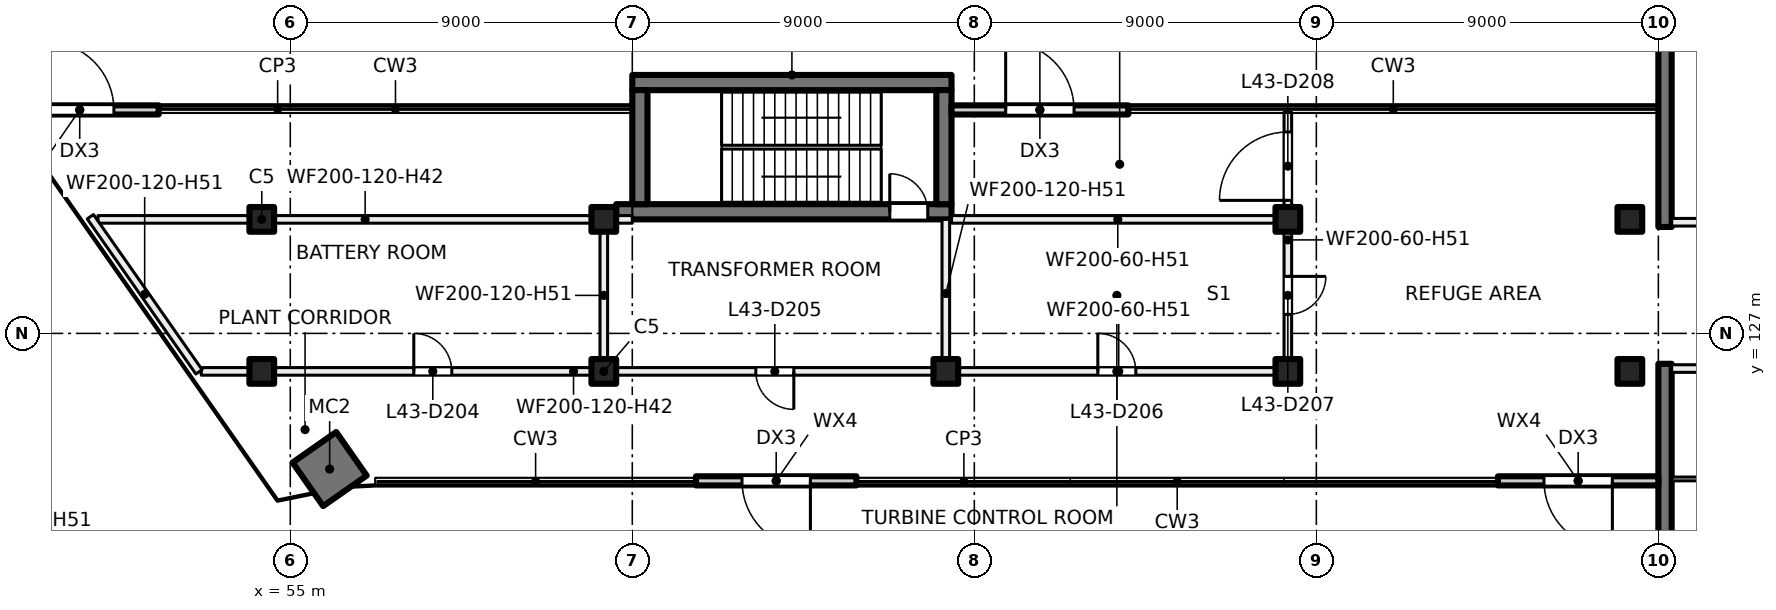
"""IFC4 building model, lengths in metres.
Left out: names, types, materials, properties, quantities, classifications, styles, units other than length and angle.
Written with IfcOpenShell. Run it as: python <this file> out.ifc"""

import sys

from ifc_helpers import new_model, si_unit, direction, frame, frame_2d, origin, origin_2d, place, context, subcontext, project, spatial, rectangle, hollow_rectangle, extrude, element, fill, save


model = new_model("IFC4")
c1 = context("Model", 3, precision=1e-05, world=origin(), true_north=direction((0.0, 1.0)))
c2 = subcontext(c1, "Body", "Model", "MODEL_VIEW")
j1 = project(units=[si_unit("LENGTHUNIT", "METRE"), si_unit("PLANEANGLEUNIT", "RADIAN")], contexts=[c1])
p1 = place(None, origin())
s1 = spatial("IfcSite", under=j1, at=p1, CompositionType="ELEMENT")
p2 = place(p1, origin())
s2 = spatial("IfcBuilding", under=s1, at=p2, CompositionType="ELEMENT")
p3 = place(p2, frame((0.0, 0.0, 182.5)))
s3 = spatial("IfcBuildingStorey", under=s2, at=p3, CompositionType="ELEMENT", Elevation=182.5)
p4 = place(p3, frame((56.036, 123.43, 0.0), z_axis=(0.0, 0.0, 1.0), x_axis=(0.573576436351, -0.819152044289, 0.0)))
e1 = element("IfcColumn", 1, at=p4, inside=s3, PredefinedType="COLUMN", context=c2, shape_type="SweptSolid", body=[
    extrude(hollow_rectangle(XDim=1.4, YDim=1.4, WallThickness=0.032, at=origin_2d()), origin(), (0.0, 0.0, 1.0), 5.5),
])
for number, where, z_axis, x_axis in (
    (2, (54.25, 130.0, 0.0), (0.0, 0.0, 1.0), (1.0, 0.0, 0.0)),
    (3, (63.25, 130.0, 0.0), (0.0, 0.0, 1.0), (1.0, 0.0, 0.0)),
    (4, (81.25, 130.0, 0.0), (0.0, 0.0, 1.0), (1.0, 0.0, 0.0)),
    (5, (90.25, 130.0, 0.0), (0.0, 0.0, 1.0), (1.0, 0.0, 0.0)),
    (6, (54.25, 126.0, 0.0), (0.0, 0.0, 1.0), (1.0, 0.0, 0.0)),
    (7, (63.25, 126.0, 0.0), (0.0, 0.0, 1.0), (1.0, 0.0, 0.0)),
    (8, (72.25, 126.0, 0.0), (0.0, 0.0, 1.0), (1.0, 0.0, 0.0)),
    (9, (81.25, 126.0, 0.0), (0.0, 0.0, 1.0), (1.0, 0.0, 0.0)),
    (10, (90.25, 126.0, 0.0), (0.0, 0.0, 1.0), (1.0, 0.0, 0.0)),
):
    element("IfcColumn", number, at=place(p3, frame(where, z_axis=z_axis, x_axis=x_axis)), inside=s3, PredefinedType="COLUMN", context=c2, shape_type="SweptSolid", body=[
        extrude(rectangle(XDim=0.65, YDim=0.65, at=origin_2d()), origin(), (0.0, 0.0, 1.0), 5.5),
    ])
for number, where, z_axis, x_axis in (
    (11, (91.175, 138.45, 0.0), (0.0, 0.0, 1.0), (0.0, -1.0, 0.0)),
    (12, (91.175, 126.2, 0.0), (0.0, 0.0, 1.0), (0.0, -1.0, 0.0)),
):
    element("IfcWall", number, at=place(p3, frame(where, z_axis=z_axis, x_axis=x_axis)), inside=s3, PredefinedType="SHEAR", context=c2, shape_type="SweptSolid", body=[
        extrude(rectangle(XDim=8.65, YDim=0.35, at=frame_2d((4.325, 0.0))), origin(), (0.0, 0.0, 1.0), 5.5),
    ])
p5 = place(p3, frame((63.575, 130.2, 0.0), z_axis=(0.0, 0.0, 1.0), x_axis=(1.0, 0.0, 0.0)))
e13 = element("IfcWall", 13, at=p5, inside=s3, PredefinedType="SHEAR", context=c2, shape_type="SweptSolid", body=[
    extrude(rectangle(XDim=8.825, YDim=0.4, at=frame_2d((4.413, 0.0))), origin(), (0.0, 0.0, 1.0), 5.5),
])
p6 = place(p5, frame((7.2, 0.0, 0.0)))
e14 = element("IfcOpeningElement", 14, at=p6, cuts=e13, PredefinedType="OPENING", context=c2, shape_type="SweptSolid", body=[
    extrude(rectangle(XDim=1.0, YDim=2.1, at=frame_2d((0.5, 1.05))), frame((0.0, 0.21, 0.0), z_axis=(0.0, -1.0, 0.0), x_axis=(1.0, 0.0, 0.0)), (0.0, 0.0, 1.0), 0.42),
])
p7 = place(p3, frame((64.0, 133.6, 0.0), z_axis=(0.0, 0.0, 1.0), x_axis=(1.0, 0.0, 0.0)))
e15 = element("IfcWall", 15, at=p7, inside=s3, PredefinedType="SHEAR", context=c2, shape_type="SweptSolid", body=[
    extrude(rectangle(XDim=8.4, YDim=0.4, at=frame_2d((4.2, 0.0))), origin(), (0.0, 0.0, 1.0), 5.5),
])
for number, where, z_axis, x_axis in (
    (16, (64.2, 130.4, 0.0), (0.0, 0.0, 1.0), (0.0, 1.0, 0.0)),
    (17, (72.2, 130.4, 0.0), (0.0, 0.0, 1.0), (0.0, 1.0, 0.0)),
):
    element("IfcWall", number, at=place(p3, frame(where, z_axis=z_axis, x_axis=x_axis)), inside=s3, PredefinedType="SHEAR", context=c2, shape_type="SweptSolid", body=[
        extrude(rectangle(XDim=3.0, YDim=0.4, at=frame_2d((1.5, 0.0))), origin(), (0.0, 0.0, 1.0), 5.5),
    ])
p8 = place(p3, frame((47.382, 132.88, 0.0), z_axis=(0.0, 0.0, 1.0), x_axis=(1.0, 0.0, 0.0)))
e18 = element("IfcWall", 18, at=p8, inside=s3, PredefinedType="SOLIDWALL", context=c2, shape_type="SweptSolid", body=[
    extrude(rectangle(XDim=4.155, YDim=0.24, at=frame_2d((2.077, 0.0))), origin(), (0.0, 0.0, 1.0), 5.125),
])
p9 = place(p8, frame((1.177, 0.0, 0.0)))
e19 = element("IfcOpeningElement", 19, at=p9, cuts=e18, PredefinedType="OPENING", context=c2, shape_type="SweptSolid", body=[
    extrude(rectangle(XDim=1.8, YDim=2.4, at=frame_2d((0.9, 1.2))), frame((0.0, 0.13, 0.0), z_axis=(0.0, -1.0, 0.0), x_axis=(1.0, 0.0, 0.0)), (0.0, 0.0, 1.0), 0.26),
])
p10 = place(p3, frame((91.0, 123.12, 0.0), z_axis=(0.0, 0.0, 1.0), x_axis=(-1.0, 0.0, 0.0)))
e20 = element("IfcWall", 20, at=p10, inside=s3, PredefinedType="SOLIDWALL", context=c2, shape_type="SweptSolid", body=[
    extrude(rectangle(XDim=4.221, YDim=0.24, at=frame_2d((2.11, 0.0))), origin(), (0.0, 0.0, 1.0), 5.125),
])
p11 = place(p10, frame((1.21, 0.0, 0.0)))
e21 = element("IfcOpeningElement", 21, at=p11, cuts=e20, PredefinedType="OPENING", context=c2, shape_type="SweptSolid", body=[
    extrude(rectangle(XDim=1.8, YDim=2.4, at=frame_2d((0.9, 1.2))), frame((0.0, 0.13, 0.0), z_axis=(0.0, -1.0, 0.0), x_axis=(1.0, 0.0, 0.0)), (0.0, 0.0, 1.0), 0.26),
])
p12 = place(p3, frame((69.897, 123.12, 0.0), z_axis=(0.0, 0.0, 1.0), x_axis=(-1.0, 0.0, 0.0)))
e22 = element("IfcWall", 22, at=p12, inside=s3, PredefinedType="SOLIDWALL", context=c2, shape_type="SweptSolid", body=[
    extrude(rectangle(XDim=4.221, YDim=0.24, at=frame_2d((2.11, 0.0))), origin(), (0.0, 0.0, 1.0), 5.125),
])
p13 = place(p12, frame((1.21, 0.0, 0.0)))
e23 = element("IfcOpeningElement", 23, at=p13, cuts=e22, PredefinedType="OPENING", context=c2, shape_type="SweptSolid", body=[
    extrude(rectangle(XDim=1.8, YDim=2.4, at=frame_2d((0.9, 1.2))), frame((0.0, 0.13, 0.0), z_axis=(0.0, -1.0, 0.0), x_axis=(1.0, 0.0, 0.0)), (0.0, 0.0, 1.0), 0.26),
])
p14 = place(p3, frame((72.4, 132.88, 0.0), z_axis=(0.0, 0.0, 1.0), x_axis=(1.0, 0.0, 0.0)))
e24 = element("IfcWall", 24, at=p14, inside=s3, PredefinedType="SOLIDWALL", context=c2, shape_type="SweptSolid", body=[
    extrude(rectangle(XDim=4.65, YDim=0.24, at=frame_2d((2.325, 0.0))), origin(), (0.0, 0.0, 1.0), 5.125),
])
p15 = place(p14, frame((1.425, 0.0, 0.0)))
e25 = element("IfcOpeningElement", 25, at=p15, cuts=e24, PredefinedType="OPENING", context=c2, shape_type="SweptSolid", body=[
    extrude(rectangle(XDim=1.8, YDim=2.4, at=frame_2d((0.9, 1.2))), frame((0.0, 0.13, 0.0), z_axis=(0.0, -1.0, 0.0), x_axis=(1.0, 0.0, 0.0)), (0.0, 0.0, 1.0), 0.26),
])
p16 = place(p3, frame((95.225, 126.075, 0.0), z_axis=(0.0, 0.0, 1.0), x_axis=(-1.0, 0.0, 0.0)))
e26 = element("IfcWall", 26, at=p16, inside=s3, PredefinedType="PARTITIONING", context=c2, shape_type="SweptSolid", body=[
    extrude(rectangle(XDim=3.875, YDim=0.2, at=frame_2d((1.938, 0.0))), origin(), (0.0, 0.0, 1.0), 5.125),
])
p17 = place(p16, frame((0.3, 0.0, 0.0)))
e27 = element("IfcOpeningElement", 27, at=p17, cuts=e26, PredefinedType="OPENING", context=c2, shape_type="SweptSolid", body=[
    extrude(rectangle(XDim=1.2, YDim=2.1, at=frame_2d((0.6, 1.05))), frame((0.0, 0.11, 0.0), z_axis=(0.0, -1.0, 0.0), x_axis=(1.0, 0.0, 0.0)), (0.0, 0.0, 1.0), 0.22),
])
p18 = place(p3, frame((93.375, 123.17, 0.0), z_axis=(0.0, 0.0, 1.0), x_axis=(-1.0, 0.0, 0.0)))
e28 = element("IfcWall", 28, at=p18, inside=s3, PredefinedType="PARTITIONING", context=c2, shape_type="SweptSolid", body=[
    extrude(rectangle(XDim=2.025, YDim=0.1, at=frame_2d((1.012, 0.0))), origin(), (0.0, 0.0, 1.0), 5.125),
])
p19 = place(p3, frame((91.35, 129.925, 0.0), z_axis=(0.0, 0.0, 1.0), x_axis=(1.0, 0.0, 0.0)))
e29 = element("IfcWall", 29, at=p19, inside=s3, PredefinedType="PARTITIONING", context=c2, shape_type="SweptSolid", body=[
    extrude(rectangle(XDim=3.875, YDim=0.2, at=frame_2d((1.938, 0.0))), origin(), (0.0, 0.0, 1.0), 5.125),
])
p20 = place(p19, frame((2.375, 0.0, 0.0)))
e30 = element("IfcOpeningElement", 30, at=p20, cuts=e29, PredefinedType="OPENING", context=c2, shape_type="SweptSolid", body=[
    extrude(rectangle(XDim=1.2, YDim=2.1, at=frame_2d((0.6, 1.05))), frame((0.0, 0.11, 0.0), z_axis=(0.0, -1.0, 0.0), x_axis=(1.0, 0.0, 0.0)), (0.0, 0.0, 1.0), 0.22),
])
p21 = place(p3, frame((49.941, 130.0, 0.0), z_axis=(0.0, 0.0, 1.0), x_axis=(1.0, 0.0, 0.0)))
e31 = element("IfcWall", 31, at=p21, inside=s3, PredefinedType="PARTITIONING", context=c2, shape_type="SweptSolid", body=[
    extrude(rectangle(XDim=14.059, YDim=0.2, at=frame_2d((7.03, 0.0))), origin(), (0.0, 0.0, 1.0), 4.225),
])
p22 = place(p3, frame((52.657, 126.0, 0.0), z_axis=(0.0, 0.0, 1.0), x_axis=(1.0, 0.0, 0.0)))
e32 = element("IfcWall", 32, at=p22, inside=s3, PredefinedType="PARTITIONING", context=c2, shape_type="SweptSolid", body=[
    extrude(rectangle(XDim=19.593, YDim=0.2, at=frame_2d((9.796, 0.0))), origin(), (0.0, 0.0, 1.0), 4.225),
])
p23 = place(p22, frame((5.593, 0.0, 0.0)))
e33 = element("IfcOpeningElement", 33, at=p23, cuts=e32, PredefinedType="OPENING", context=c2, shape_type="SweptSolid", body=[
    extrude(rectangle(XDim=1.0, YDim=2.1, at=frame_2d((0.5, 1.05))), frame((0.0, 0.11, 0.0), z_axis=(0.0, -1.0, 0.0), x_axis=(1.0, 0.0, 0.0)), (0.0, 0.0, 1.0), 0.22),
])
p24 = place(p22, frame((14.593, 0.0, 0.0)))
e34 = element("IfcOpeningElement", 34, at=p24, cuts=e32, PredefinedType="OPENING", context=c2, shape_type="SweptSolid", body=[
    extrude(rectangle(XDim=1.0, YDim=2.1, at=frame_2d((0.5, 1.05))), frame((0.0, 0.11, 0.0), z_axis=(0.0, -1.0, 0.0), x_axis=(1.0, 0.0, 0.0)), (0.0, 0.0, 1.0), 0.22),
])
p25 = place(p3, frame((63.25, 126.1, 0.0), z_axis=(0.0, 0.0, 1.0), x_axis=(0.0, 1.0, 0.0)))
e35 = element("IfcWall", 35, at=p25, inside=s3, PredefinedType="PARTITIONING", context=c2, shape_type="SweptSolid", body=[
    extrude(rectangle(XDim=3.8, YDim=0.2, at=frame_2d((1.9, 0.0))), origin(), (0.0, 0.0, 1.0), 5.125),
])
p26 = place(p3, frame((72.25, 126.1, 0.0), z_axis=(0.0, 0.0, 1.0), x_axis=(0.0, 1.0, 0.0)))
e36 = element("IfcWall", 36, at=p26, inside=s3, PredefinedType="PARTITIONING", context=c2, shape_type="SweptSolid", body=[
    extrude(rectangle(XDim=3.9, YDim=0.2, at=frame_2d((1.95, 0.0))), origin(), (0.0, 0.0, 1.0), 5.125),
])
p27 = place(p3, frame((72.25, 126.0, 0.0), z_axis=(0.0, 0.0, 1.0), x_axis=(1.0, 0.0, 0.0)))
e37 = element("IfcWall", 37, at=p27, inside=s3, PredefinedType="PARTITIONING", context=c2, shape_type="SweptSolid", body=[
    extrude(rectangle(XDim=9.1, YDim=0.2, at=frame_2d((4.55, 0.0))), origin(), (0.0, 0.0, 1.0), 5.125),
])
p28 = place(p27, frame((4.0, 0.0, 0.0)))
e38 = element("IfcOpeningElement", 38, at=p28, cuts=e37, PredefinedType="OPENING", context=c2, shape_type="SweptSolid", body=[
    extrude(rectangle(XDim=1.0, YDim=2.1, at=frame_2d((0.5, 1.05))), frame((0.0, 0.11, 0.0), z_axis=(0.0, -1.0, 0.0), x_axis=(1.0, 0.0, 0.0)), (0.0, 0.0, 1.0), 0.22),
])
p29 = place(p3, frame((72.4, 130.0, 0.0), z_axis=(0.0, 0.0, 1.0), x_axis=(1.0, 0.0, 0.0)))
e39 = element("IfcWall", 39, at=p29, inside=s3, PredefinedType="PARTITIONING", context=c2, shape_type="SweptSolid", body=[
    extrude(rectangle(XDim=8.75, YDim=0.2, at=frame_2d((4.375, 0.0))), origin(), (0.0, 0.0, 1.0), 5.125),
])
p30 = place(p3, frame((81.25, 126.1, 0.0), z_axis=(0.0, 0.0, 1.0), x_axis=(0.0, 1.0, 0.0)))
e40 = element("IfcWall", 40, at=p30, inside=s3, PredefinedType="PARTITIONING", context=c2, shape_type="SweptSolid", body=[
    extrude(rectangle(XDim=6.72, YDim=0.2, at=frame_2d((3.36, 0.0))), origin(), (0.0, 0.0, 1.0), 5.125),
])
p31 = place(p30, frame((1.4, 0.0, 0.0)))
e41 = element("IfcOpeningElement", 41, at=p31, cuts=e40, PredefinedType="OPENING", context=c2, shape_type="SweptSolid", body=[
    extrude(rectangle(XDim=1.0, YDim=2.1, at=frame_2d((0.5, 1.05))), frame((0.0, 0.11, 0.0), z_axis=(0.0, -1.0, 0.0), x_axis=(1.0, 0.0, 0.0)), (0.0, 0.0, 1.0), 0.22),
])
p32 = place(p30, frame((4.4, 0.0, 0.0)))
e42 = element("IfcOpeningElement", 42, at=p32, cuts=e40, PredefinedType="OPENING", context=c2, shape_type="SweptSolid", body=[
    extrude(rectangle(XDim=1.8, YDim=2.1, at=frame_2d((0.9, 1.05))), frame((0.0, 0.11, 0.0), z_axis=(0.0, -1.0, 0.0), x_axis=(1.0, 0.0, 0.0)), (0.0, 0.0, 1.0), 0.22),
])
p33 = place(p3, frame((52.598, 125.988, 0.0), z_axis=(0.0, 0.0, 1.0), x_axis=(-0.573659598331, 0.819093807352, 0.0)))
e43 = element("IfcWall", 43, at=p33, inside=s3, PredefinedType="PARTITIONING", context=c2, shape_type="SweptSolid", body=[
    extrude(rectangle(XDim=4.984, YDim=0.2, at=frame_2d((2.492, 0.0))), origin(), (0.0, 0.0, 1.0), 5.125),
])
p34 = place(p9, origin())
e44 = element("IfcDoor", 44, at=p34, inside=s3, OperationType="DOUBLE_DOOR_SINGLE_SWING", PredefinedType="DOOR", context=c2, shape_type="SweptSolid", body=[
    extrude(rectangle(XDim=1.8, YDim=2.4, at=frame_2d((0.9, 1.2))), frame((0.0, 0.025, 0.0), z_axis=(0.0, -1.0, 0.0), x_axis=(1.0, 0.0, 0.0)), (0.0, 0.0, 1.0), 0.05),
])
fill(e19, e44)
p35 = place(p11, origin())
e45 = element("IfcDoor", 45, at=p35, inside=s3, OperationType="DOUBLE_DOOR_SINGLE_SWING", PredefinedType="DOOR", context=c2, shape_type="SweptSolid", body=[
    extrude(rectangle(XDim=1.8, YDim=2.4, at=frame_2d((0.9, 1.2))), frame((0.0, 0.025, 0.0), z_axis=(0.0, -1.0, 0.0), x_axis=(1.0, 0.0, 0.0)), (0.0, 0.0, 1.0), 0.05),
])
fill(e21, e45)
p36 = place(p13, origin())
e46 = element("IfcDoor", 46, at=p36, inside=s3, OperationType="DOUBLE_DOOR_SINGLE_SWING", PredefinedType="DOOR", context=c2, shape_type="SweptSolid", body=[
    extrude(rectangle(XDim=1.8, YDim=2.4, at=frame_2d((0.9, 1.2))), frame((0.0, 0.025, 0.0), z_axis=(0.0, -1.0, 0.0), x_axis=(1.0, 0.0, 0.0)), (0.0, 0.0, 1.0), 0.05),
])
fill(e23, e46)
p37 = place(p15, origin())
e47 = element("IfcDoor", 47, at=p37, inside=s3, OperationType="DOUBLE_DOOR_SINGLE_SWING", PredefinedType="DOOR", context=c2, shape_type="SweptSolid", body=[
    extrude(rectangle(XDim=1.8, YDim=2.4, at=frame_2d((0.9, 1.2))), frame((0.0, 0.025, 0.0), z_axis=(0.0, -1.0, 0.0), x_axis=(1.0, 0.0, 0.0)), (0.0, 0.0, 1.0), 0.05),
])
fill(e25, e47)
p38 = place(p6, origin())
e48 = element("IfcDoor", 48, at=p38, inside=s3, OperationType="SINGLE_SWING_LEFT", PredefinedType="DOOR", context=c2, shape_type="SweptSolid", body=[
    extrude(rectangle(XDim=1.0, YDim=2.1, at=frame_2d((0.5, 1.05))), frame((0.0, 0.025, 0.0), z_axis=(0.0, -1.0, 0.0), x_axis=(1.0, 0.0, 0.0)), (0.0, 0.0, 1.0), 0.05),
])
fill(e14, e48)
p39 = place(p23, origin())
e49 = element("IfcDoor", 49, at=p39, inside=s3, OperationType="SINGLE_SWING_LEFT", PredefinedType="DOOR", context=c2, shape_type="SweptSolid", body=[
    extrude(rectangle(XDim=1.0, YDim=2.1, at=frame_2d((0.5, 1.05))), frame((0.0, 0.025, 0.0), z_axis=(0.0, -1.0, 0.0), x_axis=(1.0, 0.0, 0.0)), (0.0, 0.0, 1.0), 0.05),
])
fill(e33, e49)
p40 = place(p24, origin())
e50 = element("IfcDoor", 50, at=p40, inside=s3, OperationType="SINGLE_SWING_RIGHT", PredefinedType="DOOR", context=c2, shape_type="SweptSolid", body=[
    extrude(rectangle(XDim=1.0, YDim=2.1, at=frame_2d((0.5, 1.05))), frame((0.0, 0.025, 0.0), z_axis=(0.0, -1.0, 0.0), x_axis=(1.0, 0.0, 0.0)), (0.0, 0.0, 1.0), 0.05),
])
fill(e34, e50)
p41 = place(p28, origin())
e51 = element("IfcDoor", 51, at=p41, inside=s3, OperationType="SINGLE_SWING_LEFT", PredefinedType="DOOR", context=c2, shape_type="SweptSolid", body=[
    extrude(rectangle(XDim=1.0, YDim=2.1, at=frame_2d((0.5, 1.05))), frame((0.0, 0.025, 0.0), z_axis=(0.0, -1.0, 0.0), x_axis=(1.0, 0.0, 0.0)), (0.0, 0.0, 1.0), 0.05),
])
fill(e38, e51)
p42 = place(p31, origin())
e52 = element("IfcDoor", 52, at=p42, inside=s3, OperationType="SINGLE_SWING_RIGHT", PredefinedType="DOOR", context=c2, shape_type="SweptSolid", body=[
    extrude(rectangle(XDim=1.0, YDim=2.1, at=frame_2d((0.5, 1.05))), frame((0.0, 0.025, 0.0), z_axis=(0.0, -1.0, 0.0), x_axis=(1.0, 0.0, 0.0)), (0.0, 0.0, 1.0), 0.05),
])
fill(e41, e52)
p43 = place(p32, origin())
e53 = element("IfcDoor", 53, at=p43, inside=s3, OperationType="DOUBLE_DOOR_SINGLE_SWING", PredefinedType="DOOR", context=c2, shape_type="SweptSolid", body=[
    extrude(rectangle(XDim=1.8, YDim=2.1, at=frame_2d((0.9, 1.05))), frame((0.0, 0.025, 0.0), z_axis=(0.0, -1.0, 0.0), x_axis=(1.0, 0.0, 0.0)), (0.0, 0.0, 1.0), 0.05),
])
fill(e42, e53)
save(model, sys.argv[1])
